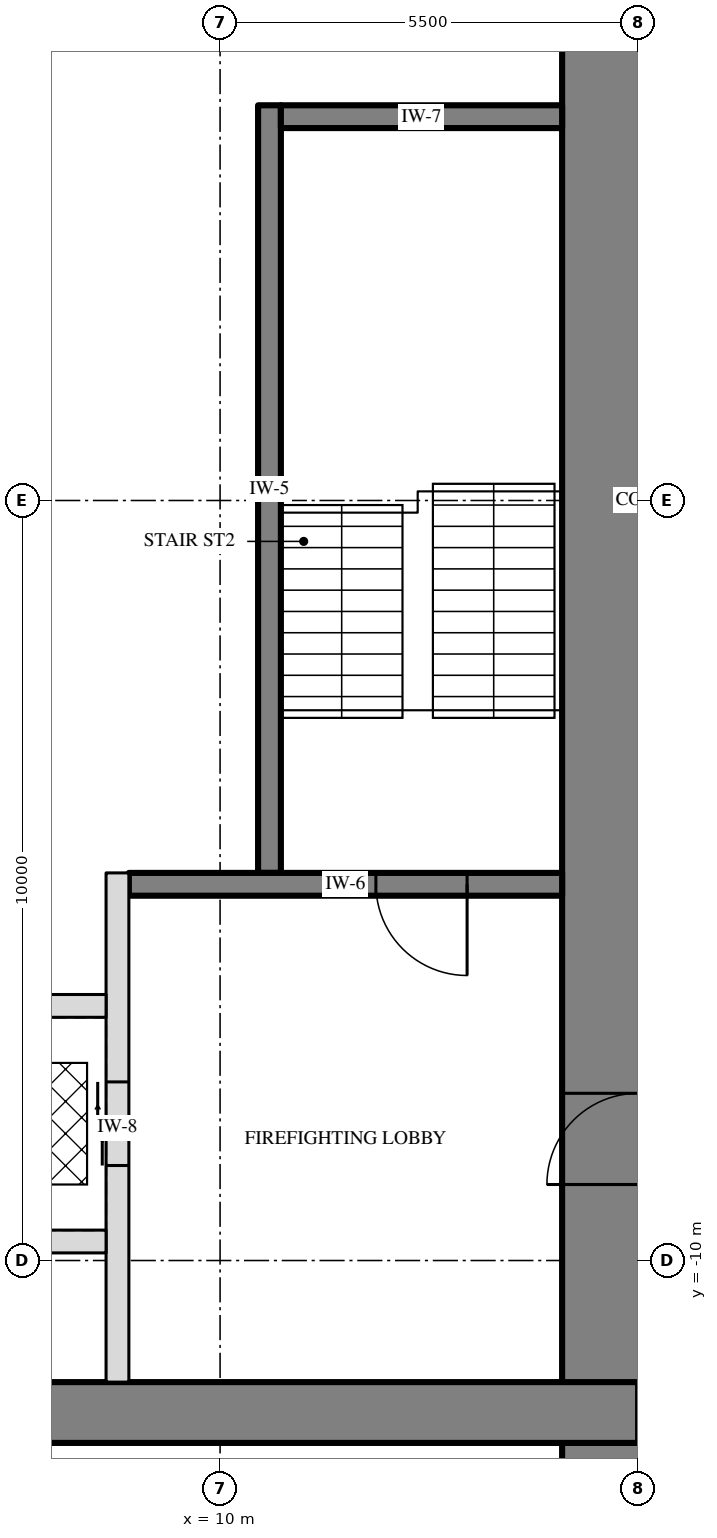
"""IFC4 building model, lengths in metres.
Left out: names, types, materials, properties, quantities, classifications, styles, units other than length and angle.
Written with IfcOpenShell. Run it as: python <this file> out.ifc"""

import sys

from ifc_helpers import new_model, si_unit, direction, frame, frame_2d, origin, place, context, subcontext, project, spatial, rectangle, extrude, element, fill, save


model = new_model("IFC4")
c1 = context("Model", 3, precision=1e-05, world=origin(), true_north=direction((0.0, 1.0)))
c2 = subcontext(c1, "Body", "Model", "MODEL_VIEW")
j1 = project(units=[si_unit("LENGTHUNIT", "METRE"), si_unit("PLANEANGLEUNIT", "RADIAN")], contexts=[c1])
p1 = place(None, origin())
s1 = spatial("IfcSite", under=j1, at=p1, CompositionType="ELEMENT")
p2 = place(p1, origin())
s2 = spatial("IfcBuilding", under=s1, at=p2, CompositionType="ELEMENT")
p3 = place(p2, frame((0.0, 0.0, 21.0)))
s3 = spatial("IfcBuildingStorey", under=s2, at=p3, CompositionType="ELEMENT", Elevation=21.0)
p4 = place(p3, frame((15.5, -15.5, -0.25), z_axis=(0.0, 0.0, 1.0), x_axis=(0.0, 1.0, 0.0)))
e1 = element("IfcWall", 1, at=p4, inside=s3, PredefinedType="SHEAR", context=c2, shape_type="SweptSolid", body=[
    extrude(rectangle(XDim=31.0, YDim=2.0, at=frame_2d((15.5, 0.0))), origin(), (0.0, 0.0, 1.0), 3.75),
])
p5 = place(p4, frame((6.5, 0.0, 0.25)))
e2 = element("IfcOpeningElement", 2, at=p5, cuts=e1, PredefinedType="OPENING", context=c2, shape_type="SweptSolid", body=[
    extrude(rectangle(XDim=1.2, YDim=2.1, at=frame_2d((0.6, 1.05))), frame((0.0, 1.01, 0.0), z_axis=(0.0, -1.0, 0.0), x_axis=(1.0, 0.0, 0.0)), (0.0, 0.0, 1.0), 2.02),
])
p6 = place(p4, frame((23.0, 0.0, 0.25)))
e3 = element("IfcOpeningElement", 3, at=p6, cuts=e1, PredefinedType="OPENING", context=c2, shape_type="SweptSolid", body=[
    extrude(rectangle(XDim=1.8, YDim=2.1, at=frame_2d((0.9, 1.05))), frame((0.0, 1.01, 0.0), z_axis=(0.0, -1.0, 0.0), x_axis=(1.0, 0.0, 0.0)), (0.0, 0.0, 1.0), 2.02),
])
p7 = place(p3, frame((-15.5, -12.0, -0.25), z_axis=(0.0, 0.0, 1.0), x_axis=(1.0, 0.0, 0.0)))
e4 = element("IfcWall", 4, at=p7, inside=s3, PredefinedType="SHEAR", context=c2, shape_type="SweptSolid", body=[
    extrude(rectangle(XDim=31.0, YDim=0.8, at=frame_2d((15.5, 0.0))), origin(), (0.0, 0.0, 1.0), 3.75),
])
p8 = place(p3, frame((10.65, -4.9, 0.0), z_axis=(0.0, 0.0, 1.0), x_axis=(0.0, 1.0, 0.0)))
e5 = element("IfcWall", 5, at=p8, inside=s3, PredefinedType="SOLIDWALL", context=c2, shape_type="SweptSolid", body=[
    extrude(rectangle(XDim=10.1, YDim=0.3, at=frame_2d((5.05, 0.0))), origin(), (0.0, 0.0, 1.0), 3.5),
])
p9 = place(p3, frame((14.5, -5.05, 0.0), z_axis=(0.0, 0.0, 1.0), x_axis=(-1.0, 0.0, 0.0)))
e6 = element("IfcWall", 6, at=p9, inside=s3, PredefinedType="SOLIDWALL", context=c2, shape_type="SweptSolid", body=[
    extrude(rectangle(XDim=5.7, YDim=0.3, at=frame_2d((2.85, 0.0))), origin(), (0.0, 0.0, 1.0), 3.5),
])
p10 = place(p9, frame((1.25, 0.0, 0.0)))
e7 = element("IfcOpeningElement", 7, at=p10, cuts=e6, PredefinedType="OPENING", context=c2, shape_type="SweptSolid", body=[
    extrude(rectangle(XDim=1.2, YDim=2.1, at=frame_2d((0.6, 1.05))), frame((0.0, 0.16, 0.0), z_axis=(0.0, -1.0, 0.0), x_axis=(1.0, 0.0, 0.0)), (0.0, 0.0, 1.0), 0.32),
])
p11 = place(p3, frame((14.5, 5.05, 0.0), z_axis=(0.0, 0.0, 1.0), x_axis=(-1.0, 0.0, 0.0)))
e8 = element("IfcWall", 8, at=p11, inside=s3, PredefinedType="SOLIDWALL", context=c2, shape_type="SweptSolid", body=[
    extrude(rectangle(XDim=3.7, YDim=0.3, at=frame_2d((1.85, 0.0))), origin(), (0.0, 0.0, 1.0), 3.5),
])
p12 = place(p3, frame((8.65, -11.6, 0.0), z_axis=(0.0, 0.0, 1.0), x_axis=(0.0, 1.0, 0.0)))
e9 = element("IfcWall", 9, at=p12, inside=s3, PredefinedType="PARTITIONING", context=c2, shape_type="SweptSolid", body=[
    extrude(rectangle(XDim=6.7, YDim=0.3, at=frame_2d((3.35, 0.0))), origin(), (0.0, 0.0, 1.0), 3.5),
])
p13 = place(p12, frame((2.85, 0.0, 0.0)))
e10 = element("IfcOpeningElement", 10, at=p13, cuts=e9, PredefinedType="OPENING", context=c2, shape_type="SweptSolid", body=[
    extrude(rectangle(XDim=1.1, YDim=2.1, at=frame_2d((0.55, 1.05))), frame((0.0, 0.16, 0.0), z_axis=(0.0, -1.0, 0.0), x_axis=(1.0, 0.0, 0.0)), (0.0, 0.0, 1.0), 0.32),
])
p14 = place(p3, frame((-8.5, -6.65, 0.0), z_axis=(0.0, 0.0, 1.0), x_axis=(1.0, 0.0, 0.0)))
e11 = element("IfcWall", 11, at=p14, inside=s3, PredefinedType="PARTITIONING", context=c2, shape_type="SweptSolid", body=[
    extrude(rectangle(XDim=17.0, YDim=0.3, at=frame_2d((8.5, 0.0))), origin(), (0.0, 0.0, 1.0), 3.5),
])
p15 = place(p14, frame((7.8, 0.0, 0.0)))
e12 = element("IfcOpeningElement", 12, at=p15, cuts=e11, PredefinedType="OPENING", context=c2, shape_type="SweptSolid", body=[
    extrude(rectangle(XDim=1.3, YDim=2.4, at=frame_2d((0.65, 1.2))), frame((0.0, 0.16, 0.0), z_axis=(0.0, -1.0, 0.0), x_axis=(1.0, 0.0, 0.0)), (0.0, 0.0, 1.0), 0.32),
])
p16 = place(p14, frame((5.65, 0.0, 0.0)))
e13 = element("IfcOpeningElement", 13, at=p16, cuts=e11, PredefinedType="OPENING", context=c2, shape_type="SweptSolid", body=[
    extrude(rectangle(XDim=0.9, YDim=2.1, at=frame_2d((0.45, 1.05))), frame((0.0, 0.16, 0.0), z_axis=(0.0, -1.0, 0.0), x_axis=(1.0, 0.0, 0.0)), (0.0, 0.0, 1.0), 0.32),
])
p17 = place(p14, frame((10.4, 0.0, 0.0)))
e14 = element("IfcOpeningElement", 14, at=p17, cuts=e11, PredefinedType="OPENING", context=c2, shape_type="SweptSolid", body=[
    extrude(rectangle(XDim=0.9, YDim=2.1, at=frame_2d((0.45, 1.05))), frame((0.0, 0.16, 0.0), z_axis=(0.0, -1.0, 0.0), x_axis=(1.0, 0.0, 0.0)), (0.0, 0.0, 1.0), 0.32),
])
p18 = place(p3, frame((5.6, -9.75, 0.0), z_axis=(0.0, 0.0, 1.0), x_axis=(1.0, 0.0, 0.0)))
e15 = element("IfcWall", 15, at=p18, inside=s3, PredefinedType="PARTITIONING", context=c2, shape_type="SweptSolid", body=[
    extrude(rectangle(XDim=2.9, YDim=0.3, at=frame_2d((1.45, 0.0))), origin(), (0.0, 0.0, 1.0), 3.5),
])
p19 = place(p3, frame((-10.65, 2.0, 0.0), z_axis=(0.0, 0.0, 1.0), x_axis=(1.0, 0.0, 0.0)))
e16 = element("IfcWall", 16, at=p19, inside=s3, PredefinedType="PARTITIONING", context=c2, shape_type="SweptSolid", body=[
    extrude(rectangle(XDim=21.3, YDim=0.3, at=frame_2d((10.65, 0.0))), origin(), (0.0, 0.0, 1.0), 3.5),
])
p20 = place(p19, frame((10.05, 0.0, 0.0)))
e17 = element("IfcOpeningElement", 17, at=p20, cuts=e16, PredefinedType="OPENING", context=c2, shape_type="SweptSolid", body=[
    extrude(rectangle(XDim=1.2, YDim=2.1, at=frame_2d((0.6, 1.05))), frame((0.0, 0.16, 0.0), z_axis=(0.0, -1.0, 0.0), x_axis=(1.0, 0.0, 0.0)), (0.0, 0.0, 1.0), 0.32),
])
p21 = place(p19, frame((18.942, 0.0, 0.0)))
e18 = element("IfcOpeningElement", 18, at=p21, cuts=e16, PredefinedType="OPENING", context=c2, shape_type="SweptSolid", body=[
    extrude(rectangle(XDim=0.9, YDim=2.1, at=frame_2d((0.45, 1.05))), frame((0.0, 0.16, 0.0), z_axis=(0.0, -1.0, 0.0), x_axis=(1.0, 0.0, 0.0)), (0.0, 0.0, 1.0), 0.32),
])
p22 = place(p10, origin())
e19 = element("IfcDoor", 19, at=p22, inside=s3, OperationType="SINGLE_SWING_LEFT", PredefinedType="DOOR", context=c2, shape_type="SweptSolid", body=[
    extrude(rectangle(XDim=1.2, YDim=2.1, at=frame_2d((0.6, 1.05))), frame((0.0, 0.025, 0.0), z_axis=(0.0, -1.0, 0.0), x_axis=(1.0, 0.0, 0.0)), (0.0, 0.0, 1.0), 0.05),
])
fill(e7, e19)
p23 = place(p5, origin())
e20 = element("IfcDoor", 20, at=p23, inside=s3, OperationType="SINGLE_SWING_LEFT", PredefinedType="DOOR", context=c2, shape_type="SweptSolid", body=[
    extrude(rectangle(XDim=1.2, YDim=2.1, at=frame_2d((0.6, 1.05))), frame((0.0, 0.025, 0.0), z_axis=(0.0, -1.0, 0.0), x_axis=(1.0, 0.0, 0.0)), (0.0, 0.0, 1.0), 0.05),
])
fill(e2, e20)
p24 = place(p13, origin())
e21 = element("IfcDoor", 21, at=p24, inside=s3, OperationType="DOUBLE_DOOR_SLIDING", PredefinedType="DOOR", context=c2, shape_type="SweptSolid", body=[
    extrude(rectangle(XDim=1.1, YDim=2.1, at=frame_2d((0.55, 1.05))), frame((0.0, 0.025, 0.0), z_axis=(0.0, -1.0, 0.0), x_axis=(1.0, 0.0, 0.0)), (0.0, 0.0, 1.0), 0.05),
])
fill(e10, e21)
p25 = place(p21, origin())
e22 = element("IfcDoor", 22, at=p25, inside=s3, OperationType="SINGLE_SWING_RIGHT", PredefinedType="DOOR", context=c2, shape_type="SweptSolid", body=[
    extrude(rectangle(XDim=0.9, YDim=2.1, at=frame_2d((0.45, 1.05))), frame((0.0, 0.025, 0.0), z_axis=(0.0, -1.0, 0.0), x_axis=(1.0, 0.0, 0.0)), (0.0, 0.0, 1.0), 0.05),
])
fill(e18, e22)
save(model, sys.argv[1])
